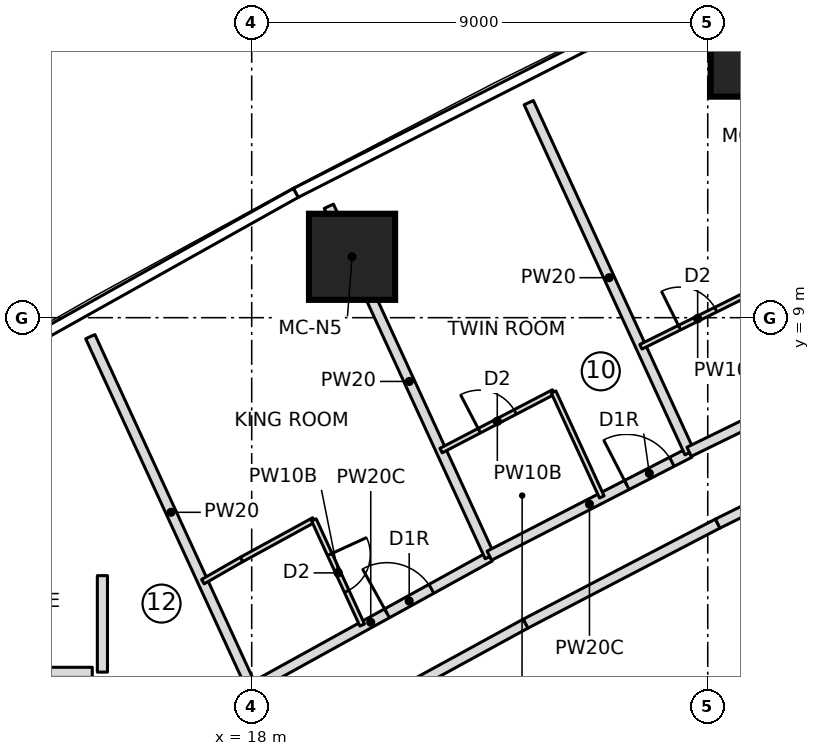
"""IFC4 building model, lengths in metres.
Left out: names, types, materials, properties, quantities, classifications, styles, units other than length and angle.
Written with IfcOpenShell. Run it as: python <this file> out.ifc"""

import sys

from ifc_helpers import new_model, si_unit, direction, frame, frame_2d, origin, origin_2d, place, context, subcontext, project, spatial, rectangle, extrude, element, fill, save


model = new_model("IFC4")
c1 = context("Model", 3, precision=1e-05, world=origin(), true_north=direction((0.0, 1.0)))
c2 = subcontext(c1, "Body", "Model", "MODEL_VIEW")
j1 = project(units=[si_unit("LENGTHUNIT", "METRE"), si_unit("PLANEANGLEUNIT", "RADIAN")], contexts=[c1])
p1 = place(None, origin())
s1 = spatial("IfcSite", under=j1, at=p1, CompositionType="ELEMENT")
p2 = place(p1, origin())
s2 = spatial("IfcBuilding", under=s1, at=p2, CompositionType="ELEMENT")
p3 = place(p2, frame((0.0, 0.0, 84.9)))
s3 = spatial("IfcBuildingStorey", under=s2, at=p3, CompositionType="ELEMENT", Elevation=84.9)
for number, where, z_axis, x_axis in (
    (1, (27.907, 14.212, 0.0), (0.0, 0.0, 1.0), (1.0, 0.0, 0.0)),
    (2, (19.981, 10.202, 0.0), (0.0, 0.0, 1.0), (1.0, 0.0, 0.0)),
):
    element("IfcColumn", number, at=place(p3, frame(where, z_axis=z_axis, x_axis=x_axis)), inside=s3, PredefinedType="COLUMN", context=c2, shape_type="SweptSolid", body=[
        extrude(rectangle(XDim=1.7, YDim=1.7, at=origin_2d()), origin(), (0.0, 0.0, 1.0), 3.55),
    ])
p4 = place(p3, frame((5.145, 2.0, 0.0), z_axis=(0.0, 0.0, 1.0), x_axis=(1.0, 0.0, 0.0)))
e3 = element("IfcWall", 3, at=p4, inside=s3, PredefinedType="PARTITIONING", context=c2, shape_type="SweptSolid", body=[
    extrude(rectangle(XDim=9.709, YDim=0.2, at=frame_2d((4.854, 0.0))), origin(), (0.0, 0.0, 1.0), 3.25),
])
p5 = place(p4, frame((4.625, 0.0, 0.0)))
e4 = element("IfcOpeningElement", 4, at=p5, cuts=e3, PredefinedType="OPENING", context=c2, shape_type="SweptSolid", body=[
    extrude(rectangle(XDim=1.0, YDim=2.1, at=frame_2d((0.5, 1.05))), frame((0.0, 0.11, 0.0), z_axis=(0.0, -1.0, 0.0), x_axis=(1.0, 0.0, 0.0)), (0.0, 0.0, 1.0), 0.22),
])
p6 = place(p3, frame((14.815, 8.626, 0.0), z_axis=(0.0, 0.0, 1.0), x_axis=(0.417432341259, -0.908708006166, 0.0)))
e5 = element("IfcWall", 5, at=p6, inside=s3, PredefinedType="PARTITIONING", context=c2, shape_type="SweptSolid", body=[
    extrude(rectangle(XDim=7.631, YDim=0.2, at=frame_2d((3.815, 0.0))), origin(), (0.0, 0.0, 1.0), 3.25),
])
p7 = place(p3, frame((18.0, 1.692, 0.0), z_axis=(0.0, 0.0, 1.0), x_axis=(0.875548487611, 0.483130257634, 0.0)))
e6 = element("IfcWall", 6, at=p7, inside=s3, PredefinedType="PARTITIONING", context=c2, shape_type="SweptSolid", body=[
    extrude(rectangle(XDim=5.367, YDim=0.2, at=frame_2d((2.683, 0.0))), origin(), (0.0, 0.0, 1.0), 3.25),
])
p8 = place(p7, frame((3.05, 0.0, 0.0)))
e7 = element("IfcOpeningElement", 7, at=p8, cuts=e6, PredefinedType="OPENING", context=c2, shape_type="SweptSolid", body=[
    extrude(rectangle(XDim=1.0, YDim=2.1, at=frame_2d((0.5, 1.05))), frame((0.0, 0.11, 0.0), z_axis=(0.0, -1.0, 0.0), x_axis=(1.0, 0.0, 0.0)), (0.0, 0.0, 1.0), 0.22),
])
p9 = place(p3, frame((17.036, 3.79, 0.0), z_axis=(0.0, 0.0, 1.0), x_axis=(0.867629162742, 0.497211862248, 0.0)))
e8 = element("IfcWall", 8, at=p9, inside=s3, PredefinedType="PARTITIONING", context=c2, shape_type="SweptSolid", body=[
    extrude(rectangle(XDim=0.882, YDim=0.1, at=frame_2d((0.441, 0.0))), origin(), (0.0, 0.0, 1.0), 3.25),
])
p10 = place(p3, frame((17.801, 4.229, 0.0), z_axis=(0.0, 0.0, 1.0), x_axis=(0.877424481957, 0.479714788663, 0.0)))
e9 = element("IfcWall", 9, at=p10, inside=s3, PredefinedType="PARTITIONING", context=c2, shape_type="SweptSolid", body=[
    extrude(rectangle(XDim=1.625, YDim=0.1, at=frame_2d((0.813, 0.0))), origin(), (0.0, 0.0, 1.0), 3.25),
])
p11 = place(p3, frame((19.228, 5.008, 0.0), z_axis=(0.0, 0.0, 1.0), x_axis=(0.417450047292, -0.908699872354, 0.0)))
e10 = element("IfcWall", 10, at=p11, inside=s3, PredefinedType="PARTITIONING", context=c2, shape_type="SweptSolid", body=[
    extrude(rectangle(XDim=2.283, YDim=0.1, at=frame_2d((1.141, 0.0))), origin(), (0.0, 0.0, 1.0), 3.25),
])
p12 = place(p11, frame((0.75, 0.0, 0.0)))
e11 = element("IfcOpeningElement", 11, at=p12, cuts=e10, PredefinedType="OPENING", context=c2, shape_type="SweptSolid", body=[
    extrude(rectangle(XDim=0.8, YDim=2.1, at=frame_2d((0.4, 1.05))), frame((0.0, 0.06, 0.0), z_axis=(0.0, -1.0, 0.0), x_axis=(1.0, 0.0, 0.0)), (0.0, 0.0, 1.0), 0.12),
])
p13 = place(p3, frame((22.699, 4.284, 0.0), z_axis=(0.0, 0.0, 1.0), x_axis=(-0.417413534969, 0.908716644959, 0.0)))
e12 = element("IfcWall", 12, at=p13, inside=s3, PredefinedType="PARTITIONING", context=c2, shape_type="SweptSolid", body=[
    extrude(rectangle(XDim=7.609, YDim=0.2, at=frame_2d((3.805, 0.0))), origin(), (0.0, 0.0, 1.0), 3.25),
])
p14 = place(p3, frame((22.69, 4.302, 0.0), z_axis=(0.0, 0.0, 1.0), x_axis=(0.889236075961, 0.457448577667, 0.0)))
e13 = element("IfcWall", 13, at=p14, inside=s3, PredefinedType="PARTITIONING", context=c2, shape_type="SweptSolid", body=[
    extrude(rectangle(XDim=4.443, YDim=0.2, at=frame_2d((2.222, 0.0))), origin(), (0.0, 0.0, 1.0), 3.25),
])
p15 = place(p14, frame((3.05, 0.0, 0.0)))
e14 = element("IfcOpeningElement", 14, at=p15, cuts=e13, PredefinedType="OPENING", context=c2, shape_type="SweptSolid", body=[
    extrude(rectangle(XDim=1.0, YDim=2.1, at=frame_2d((0.5, 1.05))), frame((0.0, 0.11, 0.0), z_axis=(0.0, -1.0, 0.0), x_axis=(1.0, 0.0, 0.0)), (0.0, 0.0, 1.0), 0.22),
])
p16 = place(p3, frame((21.738, 6.377, 0.0), z_axis=(0.0, 0.0, 1.0), x_axis=(0.886911586599, 0.461939214135, 0.0)))
e15 = element("IfcWall", 15, at=p16, inside=s3, PredefinedType="PARTITIONING", context=c2, shape_type="SweptSolid", body=[
    extrude(rectangle(XDim=2.503, YDim=0.1, at=frame_2d((1.251, 0.0))), origin(), (0.0, 0.0, 1.0), 3.25),
])
p17 = place(p16, frame((0.85, 0.0, 0.0)))
e16 = element("IfcOpeningElement", 16, at=p17, cuts=e15, PredefinedType="OPENING", context=c2, shape_type="SweptSolid", body=[
    extrude(rectangle(XDim=0.8, YDim=2.1, at=frame_2d((0.4, 1.05))), frame((0.0, 0.06, 0.0), z_axis=(0.0, -1.0, 0.0), x_axis=(1.0, 0.0, 0.0)), (0.0, 0.0, 1.0), 0.12),
])
p18 = place(p3, frame((23.958, 7.533, 0.0), z_axis=(0.0, 0.0, 1.0), x_axis=(0.417454762401, -0.908697706253, 0.0)))
e17 = element("IfcWall", 17, at=p18, inside=s3, PredefinedType="PARTITIONING", context=c2, shape_type="SweptSolid", body=[
    extrude(rectangle(XDim=2.28, YDim=0.1, at=frame_2d((1.14, 0.0))), origin(), (0.0, 0.0, 1.0), 3.25),
])
p19 = place(p3, frame((26.641, 6.335, 0.0), z_axis=(0.0, 0.0, 1.0), x_axis=(-0.417455028008, 0.908697584233, 0.0)))
e18 = element("IfcWall", 18, at=p19, inside=s3, PredefinedType="PARTITIONING", context=c2, shape_type="SweptSolid", body=[
    extrude(rectangle(XDim=7.603, YDim=0.2, at=frame_2d((3.802, 0.0))), origin(), (0.0, 0.0, 1.0), 3.25),
])
p20 = place(p3, frame((32.0, 8.973, 0.0), z_axis=(0.0, 0.0, 1.0), x_axis=(-0.898654091263, -0.438657980956, 0.0)))
e19 = element("IfcWall", 19, at=p20, inside=s3, PredefinedType="PARTITIONING", context=c2, shape_type="SweptSolid", body=[
    extrude(rectangle(XDim=5.972, YDim=0.2, at=frame_2d((2.986, 0.0))), origin(), (0.0, 0.0, 1.0), 3.25),
])
p21 = place(p20, frame((0.35, 0.0, 0.0)))
e20 = element("IfcOpeningElement", 20, at=p21, cuts=e19, PredefinedType="OPENING", context=c2, shape_type="SweptSolid", body=[
    extrude(rectangle(XDim=1.0, YDim=2.1, at=frame_2d((0.5, 1.05))), frame((0.0, 0.11, 0.0), z_axis=(0.0, -1.0, 0.0), x_axis=(1.0, 0.0, 0.0)), (0.0, 0.0, 1.0), 0.22),
])
p22 = place(p3, frame((25.681, 8.426, 0.0), z_axis=(0.0, 0.0, 1.0), x_axis=(0.895944857815, 0.444165297784, 0.0)))
e21 = element("IfcWall", 21, at=p22, inside=s3, PredefinedType="PARTITIONING", context=c2, shape_type="SweptSolid", body=[
    extrude(rectangle(XDim=2.501, YDim=0.1, at=frame_2d((1.25, 0.0))), origin(), (0.0, 0.0, 1.0), 3.25),
])
p23 = place(p22, frame((0.85, 0.0, 0.0)))
e22 = element("IfcOpeningElement", 22, at=p23, cuts=e21, PredefinedType="OPENING", context=c2, shape_type="SweptSolid", body=[
    extrude(rectangle(XDim=0.8, YDim=2.1, at=frame_2d((0.4, 1.05))), frame((0.0, 0.06, 0.0), z_axis=(0.0, -1.0, 0.0), x_axis=(1.0, 0.0, 0.0)), (0.0, 0.0, 1.0), 0.12),
])
p24 = place(p3, frame((19.657, 0.912, 0.0), z_axis=(0.0, 0.0, 1.0), x_axis=(0.877465075585, 0.479640533242, 0.0)))
e23 = element("IfcWall", 23, at=p24, inside=s3, PredefinedType="PARTITIONING", context=c2, shape_type="SweptSolid", body=[
    extrude(rectangle(XDim=4.273, YDim=0.2, at=frame_2d((2.137, 0.0))), origin(), (0.0, 0.0, 1.0), 3.25),
])
p25 = place(p3, frame((23.407, 2.962, 0.0), z_axis=(0.0, 0.0, 1.0), x_axis=(0.886899452904, 0.461962509775, 0.0)))
e24 = element("IfcWall", 24, at=p25, inside=s3, PredefinedType="PARTITIONING", context=c2, shape_type="SweptSolid", body=[
    extrude(rectangle(XDim=4.273, YDim=0.2, at=frame_2d((2.136, 0.0))), origin(), (0.0, 0.0, 1.0), 3.25),
])
p26 = place(p3, frame((27.196, 4.936, 0.0), z_axis=(0.0, 0.0, 1.0), x_axis=(0.895964304417, 0.44412606905, 0.0)))
e25 = element("IfcWall", 25, at=p26, inside=s3, PredefinedType="PARTITIONING", context=c2, shape_type="SweptSolid", body=[
    extrude(rectangle(XDim=3.609, YDim=0.2, at=frame_2d((1.804, 0.0))), origin(), (0.0, 0.0, 1.0), 3.25),
])
p27 = place(p3, frame((15.054, 3.909, 0.0), z_axis=(0.0, 0.0, 1.0), x_axis=(0.0, -1.0, 0.0)))
e26 = element("IfcWall", 26, at=p27, inside=s3, PredefinedType="PARTITIONING", context=c2, shape_type="SweptSolid", body=[
    extrude(rectangle(XDim=1.904, YDim=0.2, at=frame_2d((0.952, 0.0))), origin(), (0.0, 0.0, 1.0), 3.25),
])
p28 = place(p12, origin())
e27 = element("IfcDoor", 27, at=p28, inside=s3, OperationType="SINGLE_SWING_LEFT", PredefinedType="DOOR", context=c2, shape_type="SweptSolid", body=[
    extrude(rectangle(XDim=0.8, YDim=2.1, at=frame_2d((0.4, 1.05))), frame((0.0, 0.025, 0.0), z_axis=(0.0, -1.0, 0.0), x_axis=(1.0, 0.0, 0.0)), (0.0, 0.0, 1.0), 0.05),
])
fill(e11, e27)
p29 = place(p8, origin())
e28 = element("IfcDoor", 28, at=p29, inside=s3, OperationType="SINGLE_SWING_RIGHT", PredefinedType="DOOR", context=c2, shape_type="SweptSolid", body=[
    extrude(rectangle(XDim=1.0, YDim=2.1, at=frame_2d((0.5, 1.05))), frame((0.0, 0.025, 0.0), z_axis=(0.0, -1.0, 0.0), x_axis=(1.0, 0.0, 0.0)), (0.0, 0.0, 1.0), 0.05),
])
fill(e7, e28)
p30 = place(p17, origin())
e29 = element("IfcDoor", 29, at=p30, inside=s3, OperationType="SINGLE_SWING_LEFT", PredefinedType="DOOR", context=c2, shape_type="SweptSolid", body=[
    extrude(rectangle(XDim=0.8, YDim=2.1, at=frame_2d((0.4, 1.05))), frame((0.0, 0.025, 0.0), z_axis=(0.0, -1.0, 0.0), x_axis=(1.0, 0.0, 0.0)), (0.0, 0.0, 1.0), 0.05),
])
fill(e16, e29)
p31 = place(p15, origin())
e30 = element("IfcDoor", 30, at=p31, inside=s3, OperationType="SINGLE_SWING_RIGHT", PredefinedType="DOOR", context=c2, shape_type="SweptSolid", body=[
    extrude(rectangle(XDim=1.0, YDim=2.1, at=frame_2d((0.5, 1.05))), frame((0.0, 0.025, 0.0), z_axis=(0.0, -1.0, 0.0), x_axis=(1.0, 0.0, 0.0)), (0.0, 0.0, 1.0), 0.05),
])
fill(e14, e30)
p32 = place(p23, origin())
e31 = element("IfcDoor", 31, at=p32, inside=s3, OperationType="SINGLE_SWING_LEFT", PredefinedType="DOOR", context=c2, shape_type="SweptSolid", body=[
    extrude(rectangle(XDim=0.8, YDim=2.1, at=frame_2d((0.4, 1.05))), frame((0.0, 0.025, 0.0), z_axis=(0.0, -1.0, 0.0), x_axis=(1.0, 0.0, 0.0)), (0.0, 0.0, 1.0), 0.05),
])
fill(e22, e31)
save(model, sys.argv[1])
